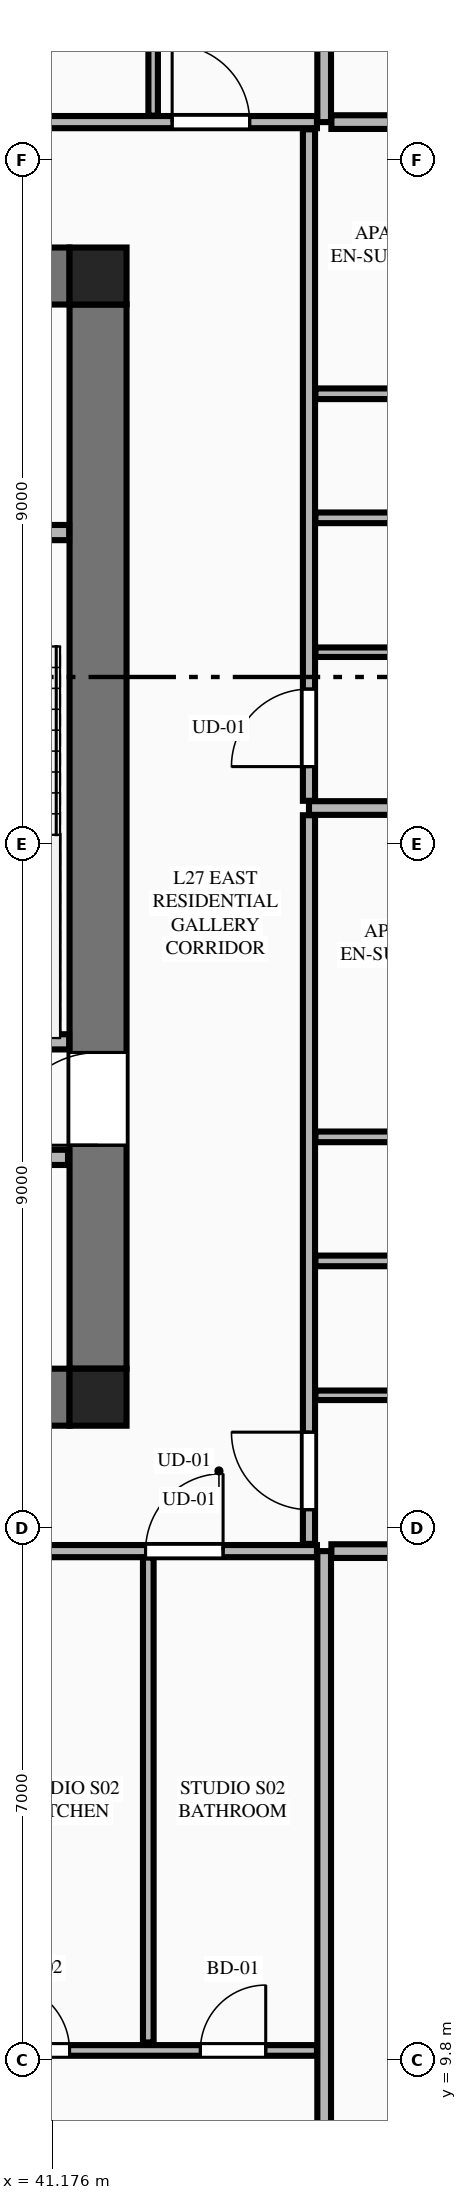
"""IFC4 building model, lengths in metres.
Left out: names, types, materials, properties, quantities, classifications, styles, units other than length and angle.
Written with IfcOpenShell. Run it as: python <this file> out.ifc"""

import sys

from ifc_helpers import new_model, si_unit, direction, frame, frame_2d, origin, origin_2d, place, context, subcontext, project, spatial, rectangle, extrude, element, fill, save


model = new_model("IFC4")
c1 = context("Model", 3, precision=1e-05, world=origin(), true_north=direction((0.0, 1.0)))
c2 = subcontext(c1, "Body", "Model", "MODEL_VIEW")
j1 = project(units=[si_unit("LENGTHUNIT", "METRE"), si_unit("PLANEANGLEUNIT", "RADIAN")], contexts=[c1])
p1 = place(None, origin())
s1 = spatial("IfcSite", under=j1, at=p1, CompositionType="ELEMENT")
p2 = place(p1, origin())
s2 = spatial("IfcBuilding", under=s1, at=p2, CompositionType="ELEMENT")
p3 = place(p2, frame((0.0, 0.0, 105.5)))
s3 = spatial("IfcBuildingStorey", under=s2, at=p3, CompositionType="ELEMENT", Elevation=105.5)
for number, where, z_axis, x_axis in (
    (1, (41.775, 18.525, 0.0), (0.0, 0.0, 1.0), (1.0, 0.0, 0.0)),
    (2, (41.775, 33.275, 0.0), (0.0, 0.0, 1.0), (1.0, 0.0, 0.0)),
):
    element("IfcColumn", number, at=place(p3, frame(where, z_axis=z_axis, x_axis=x_axis)), inside=s3, PredefinedType="COLUMN", context=c2, shape_type="SweptSolid", body=[
        extrude(rectangle(XDim=0.75, YDim=0.75, at=origin_2d()), origin(), (0.0, 0.0, 1.0), 3.55),
    ])
for number, where, z_axis, x_axis in (
    (3, (23.4, 18.525, 0.0), (0.0, 0.0, 1.0), (1.0, 0.0, 0.0)),
    (4, (23.4, 33.275, 0.0), (0.0, 0.0, 1.0), (1.0, 0.0, 0.0)),
):
    element("IfcWall", number, at=place(p3, frame(where, z_axis=z_axis, x_axis=x_axis)), inside=s3, PredefinedType="SHEAR", context=c2, shape_type="SweptSolid", body=[
        extrude(rectangle(XDim=18.0, YDim=0.75, at=frame_2d((9.0, 0.0))), origin(), (0.0, 0.0, 1.0), 3.34),
    ])
p4 = place(p3, frame((41.775, 18.9, 0.0), z_axis=(0.0, 0.0, 1.0), x_axis=(0.0, 1.0, 0.0)))
e5 = element("IfcWall", 5, at=p4, inside=s3, PredefinedType="SHEAR", context=c2, shape_type="SweptSolid", body=[
    extrude(rectangle(XDim=14.0, YDim=0.75, at=frame_2d((7.0, 0.0))), origin(), (0.0, 0.0, 1.0), 3.34),
])
p5 = place(p4, frame((2.94, 0.0, 0.0)))
e6 = element("IfcOpeningElement", 6, at=p5, cuts=e5, PredefinedType="OPENING", context=c2, shape_type="SweptSolid", body=[
    extrude(rectangle(XDim=1.22, YDim=2.25, at=frame_2d((0.61, 1.125))), frame((0.0, 0.385, 0.0), z_axis=(0.0, -1.0, 0.0), x_axis=(1.0, 0.0, 0.0)), (0.0, 0.0, 1.0), 0.77),
])
p6 = place(p3, frame((38.125, 23.2, 0.0), z_axis=(0.0, 0.0, 1.0), x_axis=(1.0, 0.0, 0.0)))
e7 = element("IfcWall", 7, at=p6, inside=s3, PredefinedType="PLUMBINGWALL", context=c2, shape_type="SweptSolid", body=[
    extrude(rectangle(XDim=3.27, YDim=0.2, at=frame_2d((1.635, 0.0))), origin(), (0.0, 0.0, 1.0), 3.34),
])
p7 = place(p3, frame((38.125, 29.9, 0.0), z_axis=(0.0, 0.0, 1.0), x_axis=(1.0, 0.0, 0.0)))
e8 = element("IfcWall", 8, at=p7, inside=s3, PredefinedType="PLUMBINGWALL", context=c2, shape_type="SweptSolid", body=[
    extrude(rectangle(XDim=3.27, YDim=0.2, at=frame_2d((1.635, 0.0))), origin(), (0.0, 0.0, 1.0), 3.34),
])
p8 = place(p7, frame((0.5, 0.0, 0.0)))
e9 = element("IfcOpeningElement", 9, at=p8, cuts=e8, PredefinedType="OPENING", context=c2, shape_type="SweptSolid", body=[
    extrude(rectangle(XDim=0.85, YDim=2.05, at=frame_2d((0.425, 1.025))), frame((0.0, 0.11, 0.0), z_axis=(0.0, -1.0, 0.0), x_axis=(1.0, 0.0, 0.0)), (0.0, 0.0, 1.0), 0.22),
])
p9 = place(p3, frame((23.42, 21.68, 0.0), z_axis=(0.0, 0.0, 1.0), x_axis=(1.0, 0.0, 0.0)))
e10 = element("IfcWall", 10, at=p9, inside=s3, PredefinedType="PLUMBINGWALL", context=c2, shape_type="SweptSolid", body=[
    extrude(rectangle(XDim=17.96, YDim=0.2, at=frame_2d((8.98, 0.0))), origin(), (0.0, 0.0, 1.0), 3.34),
])
p10 = place(p9, frame((11.6, 0.0, 0.0)))
e11 = element("IfcOpeningElement", 11, at=p10, cuts=e10, PredefinedType="OPENING", context=c2, shape_type="SweptSolid", body=[
    extrude(rectangle(XDim=1.1, YDim=2.2, at=frame_2d((0.55, 1.1))), frame((0.0, 0.11, 0.0), z_axis=(0.0, -1.0, 0.0), x_axis=(1.0, 0.0, 0.0)), (0.0, 0.0, 1.0), 0.22),
])
p11 = place(p9, frame((0.41, 0.0, 0.0)))
e12 = element("IfcOpeningElement", 12, at=p11, cuts=e10, PredefinedType="OPENING", context=c2, shape_type="SweptSolid", body=[
    extrude(rectangle(XDim=0.85, YDim=2.05, at=frame_2d((0.425, 1.025))), frame((0.0, 0.11, 0.0), z_axis=(0.0, -1.0, 0.0), x_axis=(1.0, 0.0, 0.0)), (0.0, 0.0, 1.0), 0.22),
])
p12 = place(p9, frame((6.03, 0.0, 0.0)))
e13 = element("IfcOpeningElement", 13, at=p12, cuts=e10, PredefinedType="OPENING", context=c2, shape_type="SweptSolid", body=[
    extrude(rectangle(XDim=0.85, YDim=2.05, at=frame_2d((0.425, 1.025))), frame((0.0, 0.11, 0.0), z_axis=(0.0, -1.0, 0.0), x_axis=(1.0, 0.0, 0.0)), (0.0, 0.0, 1.0), 0.22),
])
p13 = place(p9, frame((13.78, 0.0, 0.0)))
e14 = element("IfcOpeningElement", 14, at=p13, cuts=e10, PredefinedType="OPENING", context=c2, shape_type="SweptSolid", body=[
    extrude(rectangle(XDim=0.85, YDim=2.05, at=frame_2d((0.425, 1.025))), frame((0.0, 0.11, 0.0), z_axis=(0.0, -1.0, 0.0), x_axis=(1.0, 0.0, 0.0)), (0.0, 0.0, 1.0), 0.22),
])
p14 = place(p3, frame((44.75, 4.105, 0.0), z_axis=(0.0, 0.0, 1.0), x_axis=(0.0, 1.0, 0.0)))
e15 = element("IfcWall", 15, at=p14, inside=s3, PredefinedType="PARTITIONING", context=c2, shape_type="SweptSolid", body=[
    extrude(rectangle(XDim=12.395, YDim=0.18, at=frame_2d((6.198, 0.0))), origin(), (0.0, 0.0, 1.0), 3.34),
])
p15 = place(p3, frame((36.327, 16.5, 0.0), z_axis=(0.0, 0.0, 1.0), x_axis=(1.0, 0.0, 0.0)))
e16 = element("IfcWall", 16, at=p15, inside=s3, PredefinedType="PARTITIONING", context=c2, shape_type="SweptSolid", body=[
    extrude(rectangle(XDim=8.328, YDim=0.16, at=frame_2d((4.164, 0.0))), origin(), (0.0, 0.0, 1.0), 3.34),
])
p16 = place(p15, frame((6.073, 0.0, 0.0)))
e17 = element("IfcOpeningElement", 17, at=p16, cuts=e16, PredefinedType="OPENING", context=c2, shape_type="SweptSolid", body=[
    extrude(rectangle(XDim=1.02, YDim=2.25, at=frame_2d((0.51, 1.125))), frame((0.0, 0.09, 0.0), z_axis=(0.0, -1.0, 0.0), x_axis=(1.0, 0.0, 0.0)), (0.0, 0.0, 1.0), 0.18),
])
p17 = place(p3, frame((40.3, 9.931, 0.0), z_axis=(0.0, 0.0, 1.0), x_axis=(1.0, 0.0, 0.0)))
e18 = element("IfcWall", 18, at=p17, inside=s3, PredefinedType="PLUMBINGWALL", context=c2, shape_type="SweptSolid", body=[
    extrude(rectangle(XDim=4.355, YDim=0.14, at=frame_2d((2.177, 0.0))), origin(), (0.0, 0.0, 1.0), 3.34),
])
p18 = place(p17, frame((2.821, 0.0, 0.0)))
e19 = element("IfcOpeningElement", 19, at=p18, cuts=e18, PredefinedType="OPENING", context=c2, shape_type="SweptSolid", body=[
    extrude(rectangle(XDim=0.86, YDim=2.1, at=frame_2d((0.43, 1.05))), frame((0.0, 0.08, 0.0), z_axis=(0.0, -1.0, 0.0), x_axis=(1.0, 0.0, 0.0)), (0.0, 0.0, 1.0), 0.16),
])
p19 = place(p17, frame((0.22, 0.0, 0.0)))
e20 = element("IfcOpeningElement", 20, at=p19, cuts=e18, PredefinedType="OPENING", context=c2, shape_type="SweptSolid", body=[
    extrude(rectangle(XDim=0.88, YDim=2.15, at=frame_2d((0.44, 1.075))), frame((0.0, 0.08, 0.0), z_axis=(0.0, -1.0, 0.0), x_axis=(1.0, 0.0, 0.0)), (0.0, 0.0, 1.0), 0.16),
])
p20 = place(p3, frame((42.436, 10.036, 0.0), z_axis=(0.0, 0.0, 1.0), x_axis=(0.0, 1.0, 0.0)))
e21 = element("IfcWall", 21, at=p20, inside=s3, PredefinedType="PLUMBINGWALL", context=c2, shape_type="SweptSolid", body=[
    extrude(rectangle(XDim=6.379, YDim=0.14, at=frame_2d((3.189, 0.0))), origin(), (0.0, 0.0, 1.0), 2.722),
])
p21 = place(p3, frame((44.75, 35.3, 0.0), z_axis=(0.0, 0.0, 1.0), x_axis=(0.0, 1.0, 0.0)))
e22 = element("IfcWall", 22, at=p21, inside=s3, PredefinedType="PARTITIONING", context=c2, shape_type="SweptSolid", body=[
    extrude(rectangle(XDim=12.195, YDim=0.18, at=frame_2d((6.098, 0.0))), origin(), (0.0, 0.0, 1.0), 3.34),
])
p22 = place(p3, frame((28.663, 35.3, 0.0), z_axis=(0.0, 0.0, 1.0), x_axis=(1.0, 0.0, 0.0)))
e23 = element("IfcWall", 23, at=p22, inside=s3, PredefinedType="PARTITIONING", context=c2, shape_type="SweptSolid", body=[
    extrude(rectangle(XDim=15.992, YDim=0.16, at=frame_2d((7.996, 0.0))), origin(), (0.0, 0.0, 1.0), 3.34),
])
p23 = place(p22, frame((14.087, 0.0, 0.0)))
e24 = element("IfcOpeningElement", 24, at=p23, cuts=e23, PredefinedType="OPENING", context=c2, shape_type="SweptSolid", body=[
    extrude(rectangle(XDim=1.02, YDim=2.25, at=frame_2d((0.51, 1.125))), frame((0.0, 0.09, 0.0), z_axis=(0.0, -1.0, 0.0), x_axis=(1.0, 0.0, 0.0)), (0.0, 0.0, 1.0), 0.18),
])
p24 = place(p3, frame((42.5, 35.385, 0.0), z_axis=(0.0, 0.0, 1.0), x_axis=(0.0, 1.0, 0.0)))
e25 = element("IfcWall", 25, at=p24, inside=s3, PredefinedType="PARTITIONING", context=c2, shape_type="SweptSolid", body=[
    extrude(rectangle(XDim=5.42, YDim=0.125, at=frame_2d((2.71, 0.0))), origin(), (0.0, 0.0, 1.0), 2.722),
])
p25 = place(p3, frame((44.845, 16.5, 0.0), z_axis=(0.0, 0.0, 1.0), x_axis=(1.0, 0.0, 0.0)))
e26 = element("IfcWall", 26, at=p25, inside=s3, PredefinedType="PARTITIONING", context=c2, shape_type="SweptSolid", body=[
    extrude(rectangle(XDim=7.77, YDim=0.18, at=frame_2d((3.885, 0.0))), origin(), (0.0, 0.0, 1.0), 3.34),
])
p26 = place(p3, frame((44.845, 35.3, 0.0), z_axis=(0.0, 0.0, 1.0), x_axis=(1.0, 0.0, 0.0)))
e27 = element("IfcWall", 27, at=p26, inside=s3, PredefinedType="PARTITIONING", context=c2, shape_type="SweptSolid", body=[
    extrude(rectangle(XDim=7.669, YDim=0.18, at=frame_2d((3.834, 0.0))), origin(), (0.0, 0.0, 1.0), 3.34),
])
p27 = place(p3, frame((44.55, 16.595, 0.0), z_axis=(0.0, 0.0, 1.0), x_axis=(0.0, 1.0, 0.0)))
e28 = element("IfcWall", 28, at=p27, inside=s3, PredefinedType="PARTITIONING", context=c2, shape_type="SweptSolid", body=[
    extrude(rectangle(XDim=9.586, YDim=0.16, at=frame_2d((4.793, 0.0))), origin(), (0.0, 0.0, 1.0), 3.34),
])
p28 = place(p27, frame((0.45, 0.0, 0.0)))
e29 = element("IfcOpeningElement", 29, at=p28, cuts=e28, PredefinedType="OPENING", context=c2, shape_type="SweptSolid", body=[
    extrude(rectangle(XDim=1.02, YDim=2.25, at=frame_2d((0.51, 1.125))), frame((0.0, 0.09, 0.0), z_axis=(0.0, -1.0, 0.0), x_axis=(1.0, 0.0, 0.0)), (0.0, 0.0, 1.0), 0.18),
])
p29 = place(p3, frame((44.635, 18.55, 0.0), z_axis=(0.0, 0.0, 1.0), x_axis=(1.0, 0.0, 0.0)))
e30 = element("IfcWall", 30, at=p29, inside=s3, PredefinedType="PARTITIONING", context=c2, shape_type="SweptSolid", body=[
    extrude(rectangle(XDim=3.38, YDim=0.125, at=frame_2d((1.69, 0.0))), origin(), (0.0, 0.0, 1.0), 2.722),
])
for number, where, z_axis, x_axis in (
    (31, (44.635, 21.95, 0.0), (0.0, 0.0, 1.0), (1.0, 0.0, 0.0)),
    (32, (44.635, 20.318, 0.0), (0.0, 0.0, 1.0), (1.0, 0.0, 0.0)),
):
    element("IfcWall", number, at=place(p3, frame(where, z_axis=z_axis, x_axis=x_axis)), inside=s3, PredefinedType="PLUMBINGWALL", context=c2, shape_type="SweptSolid", body=[
        extrude(rectangle(XDim=3.38, YDim=0.14, at=frame_2d((1.69, 0.0))), origin(), (0.0, 0.0, 1.0), 3.34),
    ])
p30 = place(p3, frame((44.55, 26.276, 0.0), z_axis=(0.0, 0.0, 1.0), x_axis=(1.0, 0.0, 0.0)))
e33 = element("IfcWall", 33, at=p30, inside=s3, PredefinedType="PARTITIONING", context=c2, shape_type="SweptSolid", body=[
    extrude(rectangle(XDim=12.308, YDim=0.18, at=frame_2d((6.154, 0.0))), origin(), (0.0, 0.0, 1.0), 3.34),
])
p31 = place(p3, frame((44.55, 26.371, 0.0), z_axis=(0.0, 0.0, 1.0), x_axis=(0.0, 1.0, 0.0)))
e34 = element("IfcWall", 34, at=p31, inside=s3, PredefinedType="PARTITIONING", context=c2, shape_type="SweptSolid", body=[
    extrude(rectangle(XDim=8.834, YDim=0.16, at=frame_2d((4.417, 0.0))), origin(), (0.0, 0.0, 1.0), 3.34),
])
p32 = place(p31, frame((0.45, 0.0, 0.0)))
e35 = element("IfcOpeningElement", 35, at=p32, cuts=e34, PredefinedType="OPENING", context=c2, shape_type="SweptSolid", body=[
    extrude(rectangle(XDim=1.02, YDim=2.25, at=frame_2d((0.51, 1.125))), frame((0.0, 0.09, 0.0), z_axis=(0.0, -1.0, 0.0), x_axis=(1.0, 0.0, 0.0)), (0.0, 0.0, 1.0), 0.18),
])
p33 = place(p3, frame((44.635, 28.326, 0.0), z_axis=(0.0, 0.0, 1.0), x_axis=(1.0, 0.0, 0.0)))
e36 = element("IfcWall", 36, at=p33, inside=s3, PredefinedType="PARTITIONING", context=c2, shape_type="SweptSolid", body=[
    extrude(rectangle(XDim=3.38, YDim=0.125, at=frame_2d((1.69, 0.0))), origin(), (0.0, 0.0, 1.0), 3.34),
])
for number, where, z_axis, x_axis in (
    (37, (44.635, 31.726, 0.0), (0.0, 0.0, 1.0), (1.0, 0.0, 0.0)),
    (38, (44.635, 30.094, 0.0), (0.0, 0.0, 1.0), (1.0, 0.0, 0.0)),
):
    element("IfcWall", number, at=place(p3, frame(where, z_axis=z_axis, x_axis=x_axis)), inside=s3, PredefinedType="PLUMBINGWALL", context=c2, shape_type="SweptSolid", body=[
        extrude(rectangle(XDim=3.38, YDim=0.14, at=frame_2d((1.69, 0.0))), origin(), (0.0, 0.0, 1.0), 3.34),
    ])
p34 = place(p5, origin())
e39 = element("IfcDoor", 39, at=p34, inside=s3, OperationType="SINGLE_SWING_LEFT", PredefinedType="DOOR", context=c2, shape_type="SweptSolid", body=[
    extrude(rectangle(XDim=1.22, YDim=2.25, at=frame_2d((0.61, 1.125))), frame((0.0, 0.025, 0.0), z_axis=(0.0, -1.0, 0.0), x_axis=(1.0, 0.0, 0.0)), (0.0, 0.0, 1.0), 0.05),
])
fill(e6, e39)
p35 = place(p18, origin())
e40 = element("IfcDoor", 40, at=p35, inside=s3, OperationType="SINGLE_SWING_RIGHT", PredefinedType="DOOR", context=c2, shape_type="SweptSolid", body=[
    extrude(rectangle(XDim=0.86, YDim=2.1, at=frame_2d((0.43, 1.05))), frame((0.0, 0.025, 0.0), z_axis=(0.0, -1.0, 0.0), x_axis=(1.0, 0.0, 0.0)), (0.0, 0.0, 1.0), 0.05),
])
fill(e19, e40)
p36 = place(p16, origin())
e41 = element("IfcDoor", 41, at=p36, inside=s3, OperationType="SINGLE_SWING_RIGHT", PredefinedType="DOOR", context=c2, shape_type="SweptSolid", body=[
    extrude(rectangle(XDim=1.02, YDim=2.25, at=frame_2d((0.51, 1.125))), frame((0.0, 0.025, 0.0), z_axis=(0.0, -1.0, 0.0), x_axis=(1.0, 0.0, 0.0)), (0.0, 0.0, 1.0), 0.05),
])
fill(e17, e41)
p37 = place(p19, origin())
e42 = element("IfcDoor", 42, at=p37, inside=s3, OperationType="SINGLE_SWING_LEFT", PredefinedType="DOOR", context=c2, shape_type="SweptSolid", body=[
    extrude(rectangle(XDim=0.88, YDim=2.15, at=frame_2d((0.44, 1.075))), frame((0.0, 0.025, 0.0), z_axis=(0.0, -1.0, 0.0), x_axis=(1.0, 0.0, 0.0)), (0.0, 0.0, 1.0), 0.05),
])
fill(e20, e42)
p38 = place(p23, origin())
e43 = element("IfcDoor", 43, at=p38, inside=s3, OperationType="SINGLE_SWING_LEFT", PredefinedType="DOOR", context=c2, shape_type="SweptSolid", body=[
    extrude(rectangle(XDim=1.02, YDim=2.25, at=frame_2d((0.51, 1.125))), frame((0.0, 0.025, 0.0), z_axis=(0.0, -1.0, 0.0), x_axis=(1.0, 0.0, 0.0)), (0.0, 0.0, 1.0), 0.05),
])
fill(e24, e43)
p39 = place(p28, origin())
e44 = element("IfcDoor", 44, at=p39, inside=s3, OperationType="SINGLE_SWING_RIGHT", PredefinedType="DOOR", context=c2, shape_type="SweptSolid", body=[
    extrude(rectangle(XDim=1.02, YDim=2.25, at=frame_2d((0.51, 1.125))), frame((0.0, 0.025, 0.0), z_axis=(0.0, -1.0, 0.0), x_axis=(1.0, 0.0, 0.0)), (0.0, 0.0, 1.0), 0.05),
])
fill(e29, e44)
p40 = place(p32, origin())
e45 = element("IfcDoor", 45, at=p40, inside=s3, OperationType="SINGLE_SWING_LEFT", PredefinedType="DOOR", context=c2, shape_type="SweptSolid", body=[
    extrude(rectangle(XDim=1.02, YDim=2.25, at=frame_2d((0.51, 1.125))), frame((0.0, 0.025, 0.0), z_axis=(0.0, -1.0, 0.0), x_axis=(1.0, 0.0, 0.0)), (0.0, 0.0, 1.0), 0.05),
])
fill(e35, e45)
save(model, sys.argv[1])
